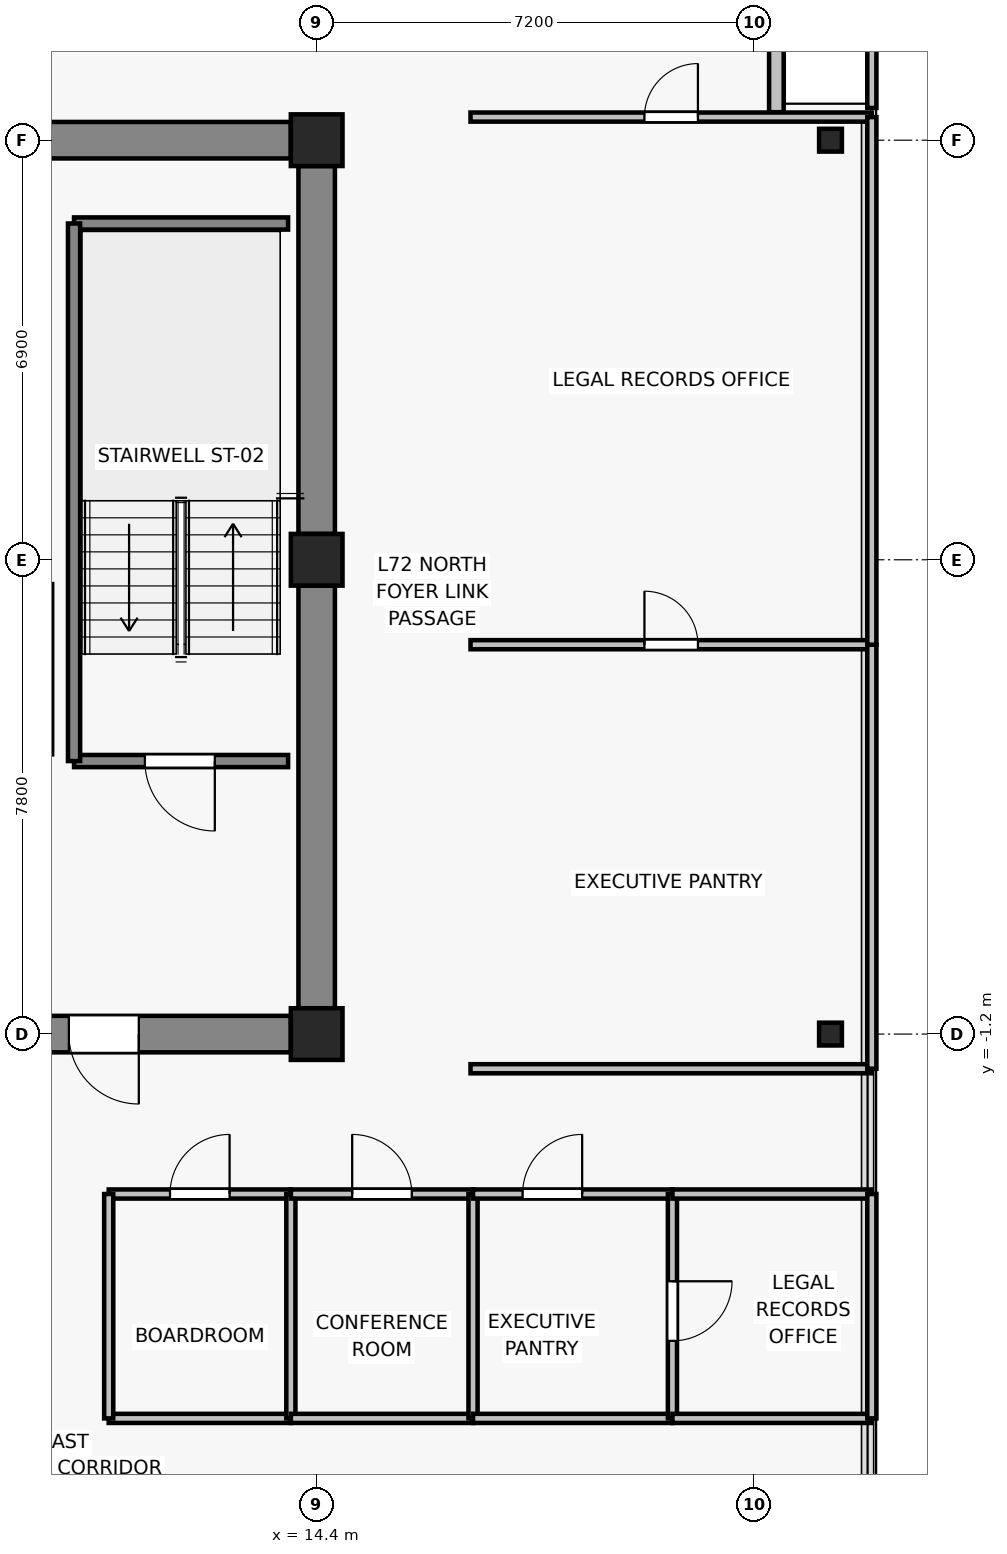
"""IFC4 building model, lengths in metres.
Left out: names, types, materials, properties, quantities, classifications, styles, units other than length and angle.
Written with IfcOpenShell. Run it as: python <this file> out.ifc"""

import sys

from ifc_helpers import new_model, si_unit, direction, frame, frame_2d, origin, origin_2d, place, context, subcontext, project, spatial, rectangle, i_section, extrude, source, transform, mapped, element, fill, save


model = new_model("IFC4")
c1 = context("Model", 3, precision=1e-05, world=origin(), true_north=direction((0.0, 1.0)))
c2 = subcontext(c1, "Body", "Model", "MODEL_VIEW")
j1 = project(units=[si_unit("LENGTHUNIT", "METRE"), si_unit("PLANEANGLEUNIT", "RADIAN")], contexts=[c1])
p1 = place(None, origin())
s1 = spatial("IfcSite", under=j1, at=p1, CompositionType="ELEMENT")
p2 = place(p1, origin())
s2 = spatial("IfcBuilding", under=s1, at=p2, CompositionType="ELEMENT")
p3 = place(p2, frame((0.0, 0.0, 255.1)))
s3 = spatial("IfcBuildingStorey", under=s2, at=p3, CompositionType="ELEMENT", Elevation=255.1)
for number, where, z_axis, x_axis in (
    (1, (14.4, -1.2, 0.0), (0.0, 0.0, 1.0), (1.0, 0.0, 0.0)),
    (2, (14.4, 6.6, 0.0), (0.0, 0.0, 1.0), (1.0, 0.0, 0.0)),
    (3, (14.4, 13.5, 0.0), (0.0, 0.0, 1.0), (1.0, 0.0, 0.0)),
):
    element("IfcColumn", number, at=place(p3, frame(where, z_axis=z_axis, x_axis=x_axis)), inside=s3, PredefinedType="COLUMN", context=c2, shape_type="SweptSolid", body=[
        extrude(rectangle(XDim=0.85, YDim=0.85, at=origin_2d()), origin(), (0.0, 0.0, 1.0), 3.3),
    ])
for number, where, z_axis, x_axis in (
    (4, (22.85, -1.2, 0.0), (0.0, 0.0, 1.0), (1.0, 0.0, 0.0)),
    (5, (22.85, 13.5, 0.0), (0.0, 0.0, 1.0), (1.0, 0.0, 0.0)),
):
    element("IfcColumn", number, at=place(p3, frame(where, z_axis=z_axis, x_axis=x_axis)), inside=s3, PredefinedType="COLUMN", context=c2, shape_type="SweptSolid", body=[
        extrude(i_section(OverallWidth=0.375, OverallDepth=0.375, WebThickness=0.017, FlangeThickness=0.027, FilletRadius=0.015, at=origin_2d()), origin(), (0.0, 0.0, 1.0), 3.3),
    ])
p4 = place(p3, frame((7.625, 13.5, 0.0), z_axis=(0.0, 0.0, 1.0), x_axis=(1.0, 0.0, 0.0)))
e6 = element("IfcWall", 6, at=p4, inside=s3, PredefinedType="SHEAR", context=c2, shape_type="SweptSolid", body=[
    extrude(rectangle(XDim=6.35, YDim=0.6, at=frame_2d((3.175, 0.0))), origin(), (0.0, 0.0, 1.0), 3.075),
])
p5 = place(p3, frame((14.4, -0.775, 0.0), z_axis=(0.0, 0.0, 1.0), x_axis=(0.0, 1.0, 0.0)))
e7 = element("IfcWall", 7, at=p5, inside=s3, PredefinedType="SHEAR", context=c2, shape_type="SweptSolid", body=[
    extrude(rectangle(XDim=6.95, YDim=0.6, at=frame_2d((3.475, 0.0))), origin(), (0.0, 0.0, 1.0), 3.075),
])
p6 = place(p3, frame((14.4, 7.025, 0.0), z_axis=(0.0, 0.0, 1.0), x_axis=(0.0, 1.0, 0.0)))
e8 = element("IfcWall", 8, at=p6, inside=s3, PredefinedType="SHEAR", context=c2, shape_type="SweptSolid", body=[
    extrude(rectangle(XDim=6.05, YDim=0.6, at=frame_2d((3.025, 0.0))), origin(), (0.0, 0.0, 1.0), 3.075),
])
p7 = place(p3, frame((13.975, -1.2, 0.0), z_axis=(0.0, 0.0, 1.0), x_axis=(-1.0, 0.0, 0.0)))
e9 = element("IfcWall", 9, at=p7, inside=s3, PredefinedType="SHEAR", context=c2, shape_type="SweptSolid", body=[
    extrude(rectangle(XDim=6.35, YDim=0.6, at=frame_2d((3.175, 0.0))), origin(), (0.0, 0.0, 1.0), 3.075),
])
p8 = place(p7, frame((2.5, 0.0, 0.0)))
e10 = element("IfcOpeningElement", 10, at=p8, cuts=e9, PredefinedType="OPENING", context=c2, shape_type="SweptSolid", body=[
    extrude(rectangle(XDim=1.15, YDim=2.15, at=frame_2d((0.575, 1.075))), frame((0.0, 0.31, 0.0), z_axis=(0.0, -1.0, 0.0), x_axis=(1.0, 0.0, 0.0)), (0.0, 0.0, 1.0), 0.62),
])
p9 = place(p3, frame((21.96, 13.96, 0.0), z_axis=(0.0, 0.0, 1.0), x_axis=(0.0, 1.0, 0.0)))
e11 = element("IfcWall", 11, at=p9, inside=s3, PredefinedType="SOLIDWALL", context=c2, shape_type="SweptSolid", body=[
    extrude(rectangle(XDim=1.5, YDim=0.24, at=frame_2d((0.75, 0.0))), origin(), (0.0, 0.0, 1.0), 3.075),
])
p10 = place(p3, frame((13.93, 3.29, 0.0), z_axis=(0.0, 0.0, 1.0), x_axis=(-1.0, 0.0, 0.0)))
e12 = element("IfcWall", 12, at=p10, inside=s3, PredefinedType="SOLIDWALL", context=c2, shape_type="SweptSolid", body=[
    extrude(rectangle(XDim=3.52, YDim=0.2, at=frame_2d((1.76, 0.0))), origin(), (0.0, 0.0, 1.0), 3.075),
])
p11 = place(p10, frame((1.205, 0.0, 0.0)))
e13 = element("IfcOpeningElement", 13, at=p11, cuts=e12, PredefinedType="OPENING", context=c2, shape_type="SweptSolid", body=[
    extrude(rectangle(XDim=1.15, YDim=2.15, at=frame_2d((0.575, 1.075))), frame((0.0, 0.11, 0.0), z_axis=(0.0, -1.0, 0.0), x_axis=(1.0, 0.0, 0.0)), (0.0, 0.0, 1.0), 0.22),
])
p12 = place(p3, frame((10.41, 12.13, 0.0), z_axis=(0.0, 0.0, 1.0), x_axis=(1.0, 0.0, 0.0)))
e14 = element("IfcWall", 14, at=p12, inside=s3, PredefinedType="SOLIDWALL", context=c2, shape_type="SweptSolid", body=[
    extrude(rectangle(XDim=3.52, YDim=0.2, at=frame_2d((1.76, 0.0))), origin(), (0.0, 0.0, 1.0), 3.075),
])
p13 = place(p3, frame((10.41, 3.29, 0.0), z_axis=(0.0, 0.0, 1.0), x_axis=(0.0, 1.0, 0.0)))
e15 = element("IfcWall", 15, at=p13, inside=s3, PredefinedType="SOLIDWALL", context=c2, shape_type="SweptSolid", body=[
    extrude(rectangle(XDim=8.84, YDim=0.2, at=frame_2d((4.42, 0.0))), origin(), (0.0, 0.0, 1.0), 3.075),
])
p14 = place(p3, frame((13.976, -7.52, 0.0), z_axis=(0.0, 0.0, 1.0), x_axis=(-1.0, 0.0, 0.0)))
e16 = element("IfcWall", 16, at=p14, inside=s3, PredefinedType="PARTITIONING", context=c2, shape_type="SweptSolid", body=[
    extrude(rectangle(XDim=2.996, YDim=0.15, at=frame_2d((1.498, 0.0))), origin(), (0.0, 0.0, 1.0), 3.075),
])
p15 = place(p3, frame((10.98, -3.83, 0.0), z_axis=(0.0, 0.0, 1.0), x_axis=(1.0, 0.0, 0.0)))
e17 = element("IfcWall", 17, at=p15, inside=s3, PredefinedType="PARTITIONING", context=c2, shape_type="SweptSolid", body=[
    extrude(rectangle(XDim=2.996, YDim=0.15, at=frame_2d((1.498, 0.0))), origin(), (0.0, 0.0, 1.0), 3.075),
])
p16 = place(p15, frame((1.008, 0.0, 0.0)))
e18 = element("IfcOpeningElement", 18, at=p16, cuts=e17, PredefinedType="OPENING", context=c2, shape_type="SweptSolid", body=[
    extrude(rectangle(XDim=0.98, YDim=2.15, at=frame_2d((0.49, 1.075))), frame((0.0, 0.085, 0.0), z_axis=(0.0, -1.0, 0.0), x_axis=(1.0, 0.0, 0.0)), (0.0, 0.0, 1.0), 0.17),
])
for number, where, z_axis, x_axis in (
    (19, (10.98, -7.52, 0.0), (0.0, 0.0, 1.0), (0.0, 1.0, 0.0)),
    (20, (13.976, -3.83, 0.0), (0.0, 0.0, 1.0), (0.0, -1.0, 0.0)),
):
    element("IfcWall", number, at=place(p3, frame(where, z_axis=z_axis, x_axis=x_axis)), inside=s3, PredefinedType="PARTITIONING", context=c2, shape_type="SweptSolid", body=[
        extrude(rectangle(XDim=3.69, YDim=0.15, at=frame_2d((1.845, 0.0))), origin(), (0.0, 0.0, 1.0), 2.705),
    ])
p17 = place(p3, frame((16.971, -7.52, 0.0), z_axis=(0.0, 0.0, 1.0), x_axis=(-1.0, 0.0, 0.0)))
e21 = element("IfcWall", 21, at=p17, inside=s3, PredefinedType="PARTITIONING", context=c2, shape_type="SweptSolid", body=[
    extrude(rectangle(XDim=2.996, YDim=0.15, at=frame_2d((1.498, 0.0))), origin(), (0.0, 0.0, 1.0), 2.615),
])
p18 = place(p3, frame((13.976, -3.83, 0.0), z_axis=(0.0, 0.0, 1.0), x_axis=(1.0, 0.0, 0.0)))
e22 = element("IfcWall", 22, at=p18, inside=s3, PredefinedType="PARTITIONING", context=c2, shape_type="SweptSolid", body=[
    extrude(rectangle(XDim=2.996, YDim=0.15, at=frame_2d((1.498, 0.0))), origin(), (0.0, 0.0, 1.0), 2.615),
])
p19 = place(p18, frame((1.008, 0.0, 0.0)))
e23 = element("IfcOpeningElement", 23, at=p19, cuts=e22, PredefinedType="OPENING", context=c2, shape_type="SweptSolid", body=[
    extrude(rectangle(XDim=0.98, YDim=2.15, at=frame_2d((0.49, 1.075))), frame((0.0, 0.085, 0.0), z_axis=(0.0, -1.0, 0.0), x_axis=(1.0, 0.0, 0.0)), (0.0, 0.0, 1.0), 0.17),
])
p20 = place(p3, frame((16.971, -3.83, 0.0), z_axis=(0.0, 0.0, 1.0), x_axis=(0.0, -1.0, 0.0)))
e24 = element("IfcWall", 24, at=p20, inside=s3, PredefinedType="PARTITIONING", context=c2, shape_type="SweptSolid", body=[
    extrude(rectangle(XDim=3.69, YDim=0.15, at=frame_2d((1.845, 0.0))), origin(), (0.0, 0.0, 1.0), 2.705),
])
p21 = place(p3, frame((20.251, -7.52, 0.0), z_axis=(0.0, 0.0, 1.0), x_axis=(-1.0, 0.0, 0.0)))
e25 = element("IfcWall", 25, at=p21, inside=s3, PredefinedType="PARTITIONING", context=c2, shape_type="SweptSolid", body=[
    extrude(rectangle(XDim=3.279, YDim=0.15, at=frame_2d((1.64, 0.0))), origin(), (0.0, 0.0, 1.0), 3.075),
])
p22 = place(p3, frame((16.971, -3.83, 0.0), z_axis=(0.0, 0.0, 1.0), x_axis=(1.0, 0.0, 0.0)))
e26 = element("IfcWall", 26, at=p22, inside=s3, PredefinedType="PARTITIONING", context=c2, shape_type="SweptSolid", body=[
    extrude(rectangle(XDim=3.279, YDim=0.15, at=frame_2d((1.64, 0.0))), origin(), (0.0, 0.0, 1.0), 3.075),
])
p23 = place(p22, frame((0.815, 0.0, 0.0)))
e27 = element("IfcOpeningElement", 27, at=p23, cuts=e26, PredefinedType="OPENING", context=c2, shape_type="SweptSolid", body=[
    extrude(rectangle(XDim=0.98, YDim=2.15, at=frame_2d((0.49, 1.075))), frame((0.0, 0.085, 0.0), z_axis=(0.0, -1.0, 0.0), x_axis=(1.0, 0.0, 0.0)), (0.0, 0.0, 1.0), 0.17),
])
p24 = place(p3, frame((20.251, -3.83, 0.0), z_axis=(0.0, 0.0, 1.0), x_axis=(0.0, -1.0, 0.0)))
e28 = element("IfcWall", 28, at=p24, inside=s3, PredefinedType="PARTITIONING", context=c2, shape_type="SweptSolid", body=[
    extrude(rectangle(XDim=3.69, YDim=0.15, at=frame_2d((1.845, 0.0))), origin(), (0.0, 0.0, 1.0), 2.705),
])
p25 = place(p24, frame((1.435, 0.0, 0.0)))
e29 = element("IfcOpeningElement", 29, at=p25, cuts=e28, PredefinedType="OPENING", context=c2, shape_type="SweptSolid", body=[
    extrude(rectangle(XDim=0.98, YDim=2.15, at=frame_2d((0.49, 1.075))), frame((0.0, 0.085, 0.0), z_axis=(0.0, -1.0, 0.0), x_axis=(1.0, 0.0, 0.0)), (0.0, 0.0, 1.0), 0.17),
])
for number, where, z_axis, x_axis in (
    (30, (23.53, -7.52, 0.0), (0.0, 0.0, 1.0), (-1.0, 0.0, 0.0)),
    (31, (20.251, -3.83, 0.0), (0.0, 0.0, 1.0), (1.0, 0.0, 0.0)),
):
    element("IfcWall", number, at=place(p3, frame(where, z_axis=z_axis, x_axis=x_axis)), inside=s3, PredefinedType="PARTITIONING", context=c2, shape_type="SweptSolid", body=[
        extrude(rectangle(XDim=3.279, YDim=0.15, at=frame_2d((1.64, 0.0))), origin(), (0.0, 0.0, 1.0), 2.765),
    ])
p26 = place(p3, frame((23.53, -3.83, 0.0), z_axis=(0.0, 0.0, 1.0), x_axis=(0.0, -1.0, 0.0)))
e32 = element("IfcWall", 32, at=p26, inside=s3, PredefinedType="PARTITIONING", context=c2, shape_type="SweptSolid", body=[
    extrude(rectangle(XDim=3.69, YDim=0.15, at=frame_2d((1.845, 0.0))), origin(), (0.0, 0.0, 1.0), 2.765),
])
p27 = place(p3, frame((23.53, -1.77, 0.0), z_axis=(0.0, 0.0, 1.0), x_axis=(-1.0, 0.0, 0.0)))
e33 = element("IfcWall", 33, at=p27, inside=s3, PredefinedType="PARTITIONING", context=c2, shape_type="SweptSolid", body=[
    extrude(rectangle(XDim=6.6, YDim=0.15, at=frame_2d((3.3, 0.0))), origin(), (0.0, 0.0, 1.0), 2.765),
])
p28 = place(p3, frame((16.93, 5.203, 0.0), z_axis=(0.0, 0.0, 1.0), x_axis=(1.0, 0.0, 0.0)))
e34 = element("IfcWall", 34, at=p28, inside=s3, PredefinedType="PARTITIONING", context=c2, shape_type="SweptSolid", body=[
    extrude(rectangle(XDim=6.6, YDim=0.15, at=frame_2d((3.3, 0.0))), origin(), (0.0, 0.0, 1.0), 2.765),
])
p29 = place(p28, frame((2.86, 0.0, 0.0)))
e35 = element("IfcOpeningElement", 35, at=p29, cuts=e34, PredefinedType="OPENING", context=c2, shape_type="SweptSolid", body=[
    extrude(rectangle(XDim=0.88, YDim=2.1, at=frame_2d((0.44, 1.05))), frame((0.0, 0.085, 0.0), z_axis=(0.0, -1.0, 0.0), x_axis=(1.0, 0.0, 0.0)), (0.0, 0.0, 1.0), 0.17),
])
p30 = place(p3, frame((23.53, 5.203, 0.0), z_axis=(0.0, 0.0, 1.0), x_axis=(0.0, -1.0, 0.0)))
e36 = element("IfcWall", 36, at=p30, inside=s3, PredefinedType="PARTITIONING", context=c2, shape_type="SweptSolid", body=[
    extrude(rectangle(XDim=6.973, YDim=0.15, at=frame_2d((3.487, 0.0))), origin(), (0.0, 0.0, 1.0), 3.075),
])
p31 = place(p3, frame((16.93, 13.88, 0.0), z_axis=(0.0, 0.0, 1.0), x_axis=(1.0, 0.0, 0.0)))
e37 = element("IfcWall", 37, at=p31, inside=s3, PredefinedType="PARTITIONING", context=c2, shape_type="SweptSolid", body=[
    extrude(rectangle(XDim=6.6, YDim=0.15, at=frame_2d((3.3, 0.0))), origin(), (0.0, 0.0, 1.0), 3.075),
])
p32 = place(p31, frame((2.86, 0.0, 0.0)))
e38 = element("IfcOpeningElement", 38, at=p32, cuts=e37, PredefinedType="OPENING", context=c2, shape_type="SweptSolid", body=[
    extrude(rectangle(XDim=0.88, YDim=2.1, at=frame_2d((0.44, 1.05))), frame((0.0, 0.085, 0.0), z_axis=(0.0, -1.0, 0.0), x_axis=(1.0, 0.0, 0.0)), (0.0, 0.0, 1.0), 0.17),
])
p33 = place(p3, frame((23.53, 13.88, 0.0), z_axis=(0.0, 0.0, 1.0), x_axis=(0.0, -1.0, 0.0)))
e39 = element("IfcWall", 39, at=p33, inside=s3, PredefinedType="PARTITIONING", context=c2, shape_type="SweptSolid", body=[
    extrude(rectangle(XDim=8.677, YDim=0.15, at=frame_2d((4.338, 0.0))), origin(), (0.0, 0.0, 1.0), 3.075),
])
p34 = place(p3, frame((23.53, 17.03, 0.0), z_axis=(0.0, 0.0, 1.0), x_axis=(0.0, -1.0, 0.0)))
e40 = element("IfcWall", 40, at=p34, inside=s3, PredefinedType="PARTITIONING", context=c2, shape_type="SweptSolid", body=[
    extrude(rectangle(XDim=3.0, YDim=0.15, at=frame_2d((1.5, 0.0))), origin(), (0.0, 0.0, 1.0), 3.075),
])
m1 = source(origin(), c2, "Body", "SweptSolid", [
    extrude(rectangle(XDim=1.15, YDim=2.15, at=frame_2d((0.575, 1.075))), frame((0.0, 0.025, 0.0), z_axis=(0.0, -1.0, 0.0), x_axis=(1.0, 0.0, 0.0)), (0.0, 0.0, 1.0), 0.05),
])
p35 = place(p11, origin())
e41 = element("IfcDoor", 41, at=p35, inside=s3, OperationType="SINGLE_SWING_LEFT", PredefinedType="DOOR", context=c2, shape_type="MappedRepresentation", body=[
    mapped(m1, transform((0.0, 0.0, 0.0), x_axis=(1.0, 0.0, 0.0), y_axis=(0.0, 1.0, 0.0), z_axis=(0.0, 0.0, 1.0), scale=1.0)),
])
fill(e13, e41)
p36 = place(p8, origin())
e42 = element("IfcDoor", 42, at=p36, inside=s3, OperationType="SINGLE_SWING_LEFT", PredefinedType="DOOR", context=c2, shape_type="MappedRepresentation", body=[
    mapped(m1, transform((0.0, 0.0, 0.0), x_axis=(1.0, 0.0, 0.0), y_axis=(0.0, 1.0, 0.0), z_axis=(0.0, 0.0, 1.0), scale=1.0)),
])
fill(e10, e42)
m2 = source(origin(), c2, "Body", "SweptSolid", [
    extrude(rectangle(XDim=0.98, YDim=2.15, at=frame_2d((0.49, 1.075))), frame((0.0, 0.025, 0.0), z_axis=(0.0, -1.0, 0.0), x_axis=(1.0, 0.0, 0.0)), (0.0, 0.0, 1.0), 0.05),
])
p37 = place(p16, origin())
e43 = element("IfcDoor", 43, at=p37, inside=s3, OperationType="SINGLE_SWING_RIGHT", PredefinedType="DOOR", context=c2, shape_type="MappedRepresentation", body=[
    mapped(m2, transform((0.0, 0.0, 0.0), x_axis=(1.0, 0.0, 0.0), y_axis=(0.0, 1.0, 0.0), z_axis=(0.0, 0.0, 1.0), scale=1.0)),
])
fill(e18, e43)
p38 = place(p19, origin())
e44 = element("IfcDoor", 44, at=p38, inside=s3, OperationType="SINGLE_SWING_LEFT", PredefinedType="DOOR", context=c2, shape_type="MappedRepresentation", body=[
    mapped(m2, transform((0.0, 0.0, 0.0), x_axis=(1.0, 0.0, 0.0), y_axis=(0.0, 1.0, 0.0), z_axis=(0.0, 0.0, 1.0), scale=1.0)),
])
fill(e23, e44)
p39 = place(p23, origin())
e45 = element("IfcDoor", 45, at=p39, inside=s3, OperationType="SINGLE_SWING_RIGHT", PredefinedType="DOOR", context=c2, shape_type="MappedRepresentation", body=[
    mapped(m2, transform((0.0, 0.0, 0.0), x_axis=(1.0, 0.0, 0.0), y_axis=(0.0, 1.0, 0.0), z_axis=(0.0, 0.0, 1.0), scale=1.0)),
])
fill(e27, e45)
p40 = place(p25, origin())
e46 = element("IfcDoor", 46, at=p40, inside=s3, OperationType="SINGLE_SWING_LEFT", PredefinedType="DOOR", context=c2, shape_type="MappedRepresentation", body=[
    mapped(m2, transform((0.0, 0.0, 0.0), x_axis=(1.0, 0.0, 0.0), y_axis=(0.0, 1.0, 0.0), z_axis=(0.0, 0.0, 1.0), scale=1.0)),
])
fill(e29, e46)
m3 = source(origin(), c2, "Body", "SweptSolid", [
    extrude(rectangle(XDim=0.88, YDim=2.1, at=frame_2d((0.44, 1.05))), frame((0.0, 0.025, 0.0), z_axis=(0.0, -1.0, 0.0), x_axis=(1.0, 0.0, 0.0)), (0.0, 0.0, 1.0), 0.05),
])
p41 = place(p29, origin())
e47 = element("IfcDoor", 47, at=p41, inside=s3, OperationType="SINGLE_SWING_LEFT", PredefinedType="DOOR", context=c2, shape_type="MappedRepresentation", body=[
    mapped(m3, transform((0.0, 0.0, 0.0), x_axis=(1.0, 0.0, 0.0), y_axis=(0.0, 1.0, 0.0), z_axis=(0.0, 0.0, 1.0), scale=1.0)),
])
fill(e35, e47)
p42 = place(p32, origin())
e48 = element("IfcDoor", 48, at=p42, inside=s3, OperationType="SINGLE_SWING_RIGHT", PredefinedType="DOOR", context=c2, shape_type="MappedRepresentation", body=[
    mapped(m3, transform((0.0, 0.0, 0.0), x_axis=(1.0, 0.0, 0.0), y_axis=(0.0, 1.0, 0.0), z_axis=(0.0, 0.0, 1.0), scale=1.0)),
])
fill(e38, e48)
save(model, sys.argv[1])
